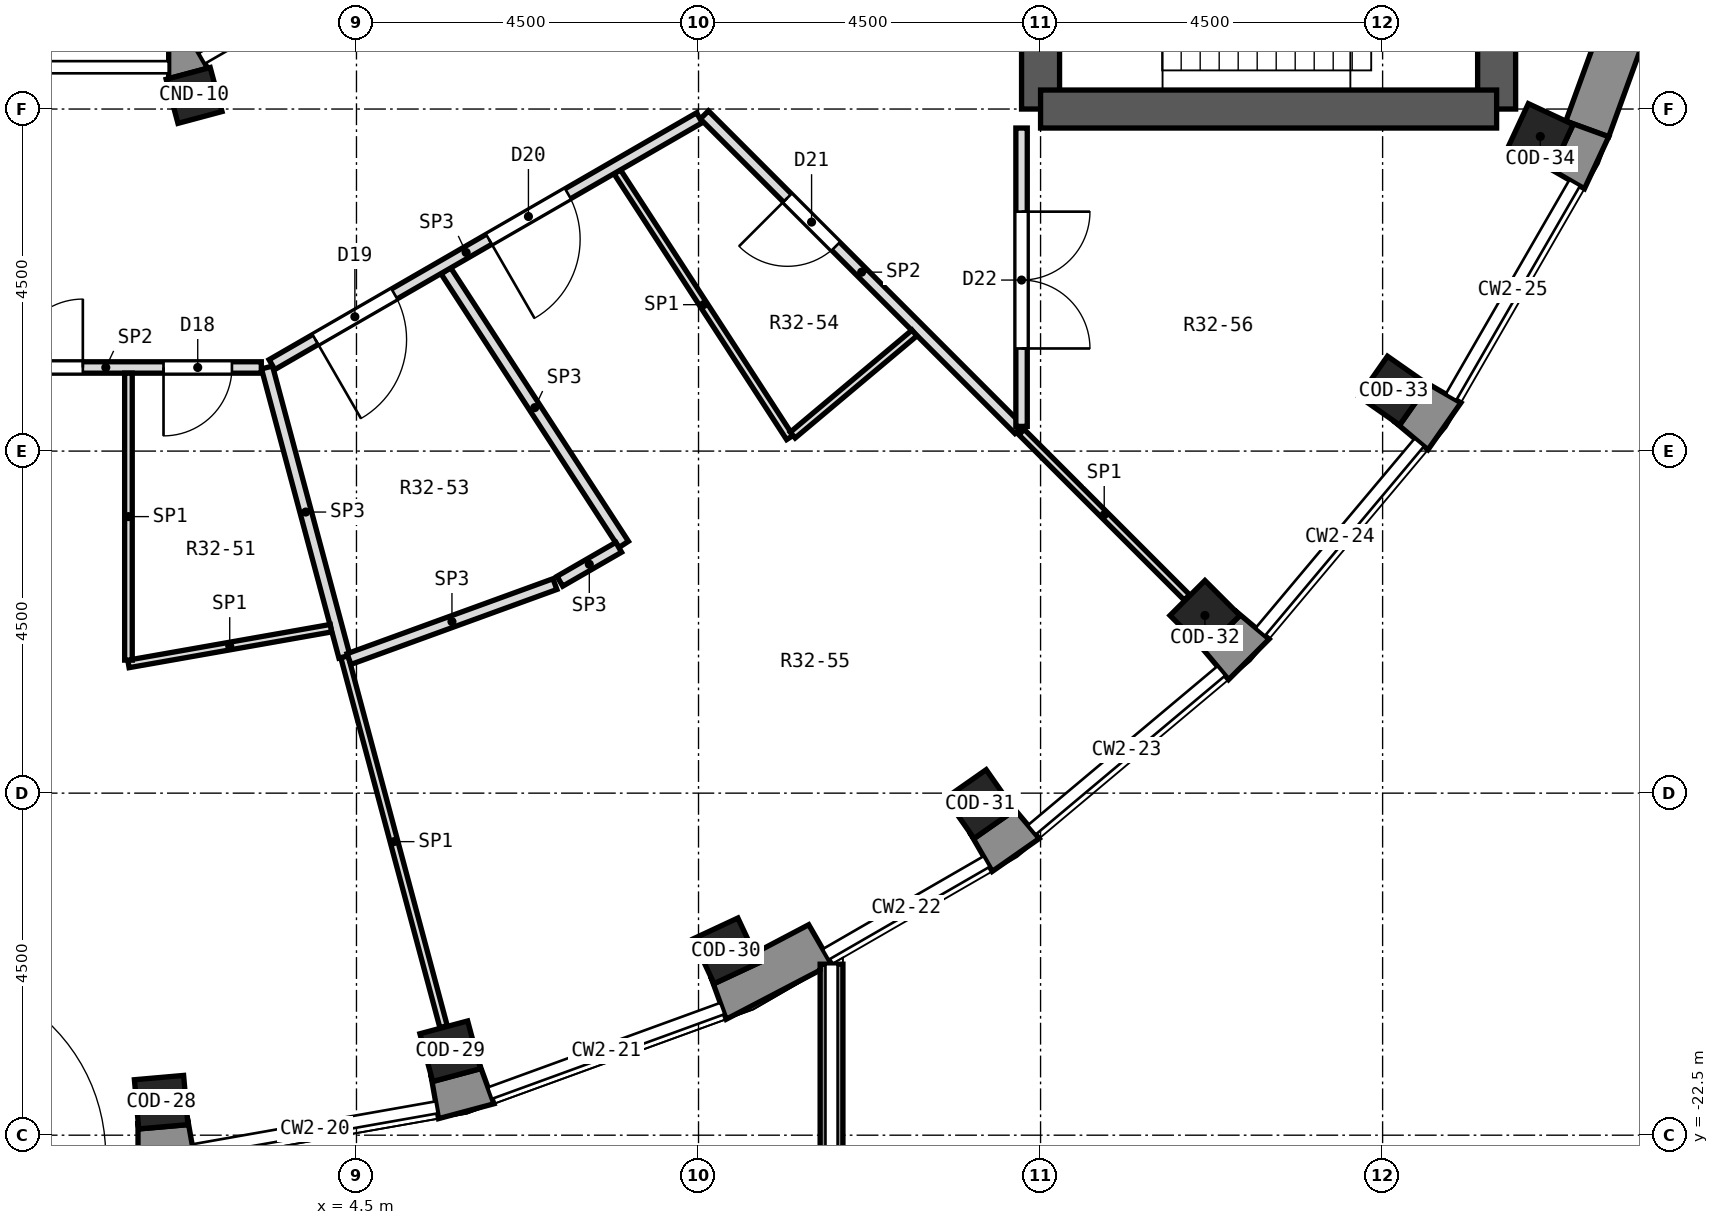
"""IFC4 building model, lengths in metres.
Left out: names, types, materials, properties, quantities, classifications, styles, units other than length and angle.
Written with IfcOpenShell. Run it as: python <this file> out.ifc"""

import sys

from ifc_helpers import new_model, si_unit, direction, frame, frame_2d, origin, origin_2d, place, context, subcontext, project, spatial, polyline, rectangle, outline, extrude, element, fill, save


model = new_model("IFC4")
c1 = context("Model", 3, precision=1e-05, world=origin(), true_north=direction((0.0, 1.0)))
c2 = subcontext(c1, "Body", "Model", "MODEL_VIEW")
j1 = project(units=[si_unit("LENGTHUNIT", "METRE"), si_unit("PLANEANGLEUNIT", "RADIAN")], contexts=[c1])
p1 = place(None, origin())
s1 = spatial("IfcSite", under=j1, at=p1, CompositionType="ELEMENT")
p2 = place(p1, origin())
s2 = spatial("IfcBuilding", under=s1, at=p2, CompositionType="ELEMENT")
p3 = place(p2, frame((0.0, 0.0, 224.7)))
s3 = spatial("IfcBuildingStorey", under=s2, at=p3, CompositionType="ELEMENT", Elevation=224.7)
p4 = place(p3, frame((10.75, -29.512, 0.0), z_axis=(0.0, 0.0, 1.0), x_axis=(0.0, 1.0, 0.0)))
e1 = element("IfcWall", 1, at=p4, inside=s3, PredefinedType="SOLIDWALL", context=c2, shape_type="SweptSolid", body=[
    extrude(rectangle(XDim=9.262, YDim=0.3, at=frame_2d((4.631, 0.0))), origin(), (0.0, 0.0, 1.0), 1.7),
])
for number, where, z_axis, x_axis in (
    (2, (1.93, -22.066, -1.15), (0.0, 0.0, 1.0), (0.087, -0.996, 0.0)),
    (3, (5.733, -21.395, -1.15), (0.0, 0.0, 1.0), (0.259, -0.966, 0.0)),
    (4, (9.361, -20.075, -1.15), (0.0, 0.0, 1.0), (0.423, -0.906, 0.0)),
):
    element("IfcColumn", number, at=place(p3, frame(where, z_axis=z_axis, x_axis=x_axis)), inside=s3, PredefinedType="COLUMN", context=c2, shape_type="SweptSolid", body=[
        extrude(rectangle(XDim=0.65, YDim=0.65, at=origin_2d()), origin(), (0.0, 0.0, 1.0), 6.15),
    ])
for number, where, z_axis, x_axis in (
    (5, (12.705, -18.144, -0.55), (0.0, 0.0, 1.0), (0.574, -0.819, 0.0)),
    (6, (15.662, -15.662, -0.55), (0.0, 0.0, 1.0), (0.707, -0.707, 0.0)),
    (7, (18.144, -12.705, -0.55), (0.0, 0.0, 1.0), (0.819, -0.574, 0.0)),
    (8, (20.075, -9.361, -0.55), (0.0, 0.0, 1.0), (0.906, -0.423, 0.0)),
):
    element("IfcColumn", number, at=place(p3, frame(where, z_axis=z_axis, x_axis=x_axis)), inside=s3, PredefinedType="COLUMN", context=c2, shape_type="SweptSolid", body=[
        extrude(rectangle(XDim=0.65, YDim=0.65, at=origin_2d()), origin(), (0.0, 0.0, 1.0), 5.55),
    ])
p5 = place(p3, frame((2.364, -8.821, 0.0), z_axis=(0.0, 0.0, 1.0), x_axis=(0.258819045103, -0.965925826289, 0.0)))
e9 = element("IfcColumn", 9, at=p5, inside=s3, PredefinedType="COLUMN", context=c2, shape_type="SweptSolid", body=[
    extrude(rectangle(XDim=0.6, YDim=0.6, at=origin_2d()), origin(), (0.0, 0.0, 1.0), 5.0),
])
p6 = place(p3, frame((13.5, -9.0, 0.0), z_axis=(0.0, 0.0, 1.0), x_axis=(0.0, 1.0, 0.0)))
e10 = element("IfcWall", 10, at=p6, inside=s3, PredefinedType="SHEAR", context=c2, shape_type="SweptSolid", body=[
    extrude(rectangle(XDim=18.0, YDim=0.5, at=frame_2d((9.0, 0.0))), origin(), (0.0, 0.0, 1.0), 5.0),
])
p7 = place(p6, frame((15.4, 0.0, 0.0)))
e11 = element("IfcOpeningElement", 11, at=p7, cuts=e10, PredefinedType="OPENING", context=c2, shape_type="SweptSolid", body=[
    extrude(rectangle(XDim=1.2, YDim=2.1, at=frame_2d((0.6, 1.05))), frame((0.0, 0.262, 0.0), z_axis=(0.0, -1.0, 0.0), x_axis=(1.0, 0.0, 0.0)), (0.0, 0.0, 1.0), 0.524),
])
p8 = place(p6, frame((1.4, 0.0, 0.0)))
e12 = element("IfcOpeningElement", 12, at=p8, cuts=e10, PredefinedType="OPENING", context=c2, shape_type="SweptSolid", body=[
    extrude(rectangle(XDim=1.2, YDim=2.1, at=frame_2d((0.6, 1.05))), frame((0.0, 0.262, 0.0), z_axis=(0.0, -1.0, 0.0), x_axis=(1.0, 0.0, 0.0)), (0.0, 0.0, 1.0), 0.524),
])
p9 = place(p6, frame((7.5, 0.0, 0.0)))
e13 = element("IfcOpeningElement", 13, at=p9, cuts=e10, PredefinedType="OPENING", context=c2, shape_type="SweptSolid", body=[
    extrude(rectangle(XDim=3.0, YDim=2.4, at=frame_2d((1.5, 1.2))), frame((0.0, 0.262, 0.0), z_axis=(0.0, -1.0, 0.0), x_axis=(1.0, 0.0, 0.0)), (0.0, 0.0, 1.0), 0.524),
])
p10 = place(p3, frame((19.5, -9.0, 0.0), z_axis=(0.0, 0.0, 1.0), x_axis=(0.0, 1.0, 0.0)))
e14 = element("IfcWall", 14, at=p10, inside=s3, PredefinedType="SHEAR", context=c2, shape_type="SweptSolid", body=[
    extrude(rectangle(XDim=18.0, YDim=0.5, at=frame_2d((9.0, 0.0))), origin(), (0.0, 0.0, 1.0), 5.0),
])
p11 = place(p10, frame((9.45, 0.0, 0.0)))
e15 = element("IfcOpeningElement", 15, at=p11, cuts=e14, PredefinedType="OPENING", context=c2, shape_type="SweptSolid", body=[
    extrude(rectangle(XDim=0.9, YDim=2.1, at=frame_2d((0.45, 1.05))), frame((0.0, 0.262, 0.0), z_axis=(0.0, -1.0, 0.0), x_axis=(1.0, 0.0, 0.0)), (0.0, 0.0, 1.0), 0.524),
])
p12 = place(p10, frame((7.65, 0.0, 0.0)))
e16 = element("IfcOpeningElement", 16, at=p12, cuts=e14, PredefinedType="OPENING", context=c2, shape_type="SweptSolid", body=[
    extrude(rectangle(XDim=0.9, YDim=2.1, at=frame_2d((0.45, 1.05))), frame((0.0, 0.262, 0.0), z_axis=(0.0, -1.0, 0.0), x_axis=(1.0, 0.0, 0.0)), (0.0, 0.0, 1.0), 0.524),
])
p13 = place(p3, frame((13.5, -9.0, 0.0), z_axis=(0.0, 0.0, 1.0), x_axis=(1.0, 0.0, 0.0)))
e17 = element("IfcWall", 17, at=p13, inside=s3, PredefinedType="SHEAR", context=c2, shape_type="SweptSolid", body=[
    extrude(rectangle(XDim=6.0, YDim=0.5, at=frame_2d((3.0, 0.0))), origin(), (0.0, 0.0, 1.0), 5.0),
])
p14 = place(p3, frame((20.693, -9.262, 0.0), z_axis=(0.0, 0.0, 1.0), x_axis=(0.342056509473, 0.939679383794, 0.0)))
e18 = element("IfcWall", 18, at=p14, inside=s3, PredefinedType="SOLIDWALL", context=c2, shape_type="SweptSolid", body=[
    extrude(rectangle(XDim=3.252, YDim=0.6, at=frame_2d((1.626, 0.0))), origin(), (0.0, 0.0, 1.0), 4.6),
])
p15 = place(p3, origin())
e19 = element("IfcWall", 19, at=p15, inside=s3, PredefinedType="SOLIDWALL", context=c2, shape_type="SweptSolid", body=[
    extrude(outline(polyline([(1.626, -22.913), (2.378, -22.847), (2.273, -22.256), (2.283, -22.361), (1.635, -22.418), (1.626, -22.312), (1.626, -22.913)])), origin(), (0.0, 0.0, 1.0), 4.6),
])
p16 = place(p3, origin())
e20 = element("IfcWall", 20, at=p16, inside=s3, PredefinedType="SOLIDWALL", context=c2, shape_type="SweptSolid", body=[
    extrude(outline(polyline([(6.309, -22.087), (6.104, -21.523), (6.131, -21.625), (5.503, -21.793), (5.476, -21.691), (5.58, -22.282), (6.309, -22.087)])), origin(), (0.0, 0.0, 1.0), 4.6),
])
p17 = place(p3, origin())
e21 = element("IfcWall", 21, at=p17, inside=s3, PredefinedType="SOLIDWALL", context=c2, shape_type="SweptSolid", body=[
    extrude(outline(polyline([(9.159, -20.411), (9.364, -20.975), (10.6, -20.329), (10.6, -20.25), (10.75, -20.25), (10.45, -19.731), (9.735, -20.107), (9.793, -20.232), (9.204, -20.507), (9.159, -20.411)])), origin(), (0.0, 0.0, 1.0), 4.6),
])
p18 = place(p3, origin())
e22 = element("IfcWall", 22, at=p18, inside=s3, PredefinedType="SOLIDWALL", context=c2, shape_type="SweptSolid", body=[
    extrude(outline(polyline([(12.864, -19.03), (13.482, -18.597), (13.097, -18.137), (13.157, -18.224), (12.625, -18.597), (12.564, -18.51), (12.864, -19.03)])), origin(), (0.0, 0.0, 1.0), 4.6),
])
p19 = place(p3, origin())
e23 = element("IfcWall", 23, at=p19, inside=s3, PredefinedType="SOLIDWALL", context=c2, shape_type="SweptSolid", body=[
    extrude(outline(polyline([(16.507, -15.973), (16.047, -15.588), (16.122, -15.662), (15.662, -16.122), (15.588, -16.047), (15.973, -16.507), (16.507, -15.973)])), origin(), (0.0, 0.0, 1.0), 4.6),
])
p20 = place(p3, origin())
e24 = element("IfcWall", 24, at=p20, inside=s3, PredefinedType="SOLIDWALL", context=c2, shape_type="SweptSolid", body=[
    extrude(outline(polyline([(19.03, -12.864), (18.51, -12.564), (18.597, -12.625), (18.224, -13.157), (18.137, -13.097), (18.597, -13.482), (19.03, -12.864)])), origin(), (0.0, 0.0, 1.0), 4.6),
])
p21 = place(p3, origin())
e25 = element("IfcWall", 25, at=p21, inside=s3, PredefinedType="SOLIDWALL", context=c2, shape_type="SweptSolid", body=[
    extrude(outline(polyline([(20.656, -10.048), (20.975, -9.364), (20.411, -9.159), (20.507, -9.204), (20.232, -9.793), (20.136, -9.748), (20.656, -10.048)])), origin(), (0.0, 0.0, 1.0), 4.6),
])
p22 = place(p3, origin())
e26 = element("IfcWall", 26, at=p22, inside=s3, PredefinedType="SOLIDWALL", context=c2, shape_type="SweptSolid", body=[
    extrude(outline(polyline([(2.542, -8.462), (2.242, -7.943), (2.029, -8.0), (2.029, -8.6), (2.542, -8.462)])), origin(), (0.0, 0.0, 1.0), 4.6),
])
p23 = place(p3, frame((4.342, -16.205, 0.0), z_axis=(0.0, 0.0, 1.0), x_axis=(0.258748195279, -0.965944807657, 0.0)))
e27 = element("IfcWall", 27, at=p23, inside=s3, PredefinedType="PARTITIONING", context=c2, shape_type="SweptSolid", body=[
    extrude(rectangle(XDim=5.039, YDim=0.1, at=frame_2d((2.519, 0.0))), origin(), (0.0, 0.0, 1.0), 4.6),
])
p24 = place(p3, frame((3.323, -12.4, 0.0), z_axis=(0.0, 0.0, 1.0), x_axis=(0.258646238559, -0.965972113096, 0.0)))
e28 = element("IfcWall", 28, at=p24, inside=s3, PredefinedType="PARTITIONING", context=c2, shape_type="SweptSolid", body=[
    extrude(rectangle(XDim=3.939, YDim=0.15, at=frame_2d((1.969, 0.0))), origin(), (0.0, 0.0, 1.0), 4.6),
])
p25 = place(p3, frame((5.676, -11.128, 0.0), z_axis=(0.0, 0.0, 1.0), x_axis=(0.544832434593, -0.838544941083, 0.0)))
e29 = element("IfcWall", 29, at=p25, inside=s3, PredefinedType="PARTITIONING", context=c2, shape_type="SweptSolid", body=[
    extrude(rectangle(XDim=4.293, YDim=0.15, at=frame_2d((2.146, 0.0))), origin(), (0.0, 0.0, 1.0), 4.6),
])
p26 = place(p3, frame((7.931, -9.826, 0.0), z_axis=(0.0, 0.0, 1.0), x_axis=(0.544576550515, -0.838711142545, 0.0)))
e30 = element("IfcWall", 30, at=p26, inside=s3, PredefinedType="PARTITIONING", context=c2, shape_type="SweptSolid", body=[
    extrude(rectangle(XDim=4.168, YDim=0.1, at=frame_2d((2.084, 0.0))), origin(), (0.0, 0.0, 1.0), 4.6),
])
p27 = place(p3, frame((13.25, -13.25, 0.0), z_axis=(0.0, 0.0, 1.0), x_axis=(0.707106781187, -0.707106781187, 0.0)))
e31 = element("IfcWall", 31, at=p27, inside=s3, PredefinedType="PARTITIONING", context=c2, shape_type="SweptSolid", body=[
    extrude(rectangle(XDim=3.077, YDim=0.1, at=frame_2d((1.538, 0.0))), origin(), (0.0, 0.0, 1.0), 4.6),
])
p28 = place(p3, frame((9.077, -9.077, 0.0), z_axis=(0.0, 0.0, 1.0), x_axis=(0.707106781187, -0.707106781187, 0.0)))
e32 = element("IfcWall", 32, at=p28, inside=s3, PredefinedType="PARTITIONING", context=c2, shape_type="SweptSolid", body=[
    extrude(rectangle(XDim=5.852, YDim=0.15, at=frame_2d((2.926, 0.0))), origin(), (0.0, 0.0, 1.0), 4.6),
])
p29 = place(p28, frame((1.545, 0.0, 0.0)))
e33 = element("IfcOpeningElement", 33, at=p29, cuts=e32, PredefinedType="OPENING", context=c2, shape_type="SweptSolid", body=[
    extrude(rectangle(XDim=0.9, YDim=2.1, at=frame_2d((0.45, 1.05))), frame((0.0, 0.087, 0.0), z_axis=(0.0, -1.0, 0.0), x_axis=(1.0, 0.0, 0.0)), (0.0, 0.0, 1.0), 0.174),
])
p30 = place(p3, frame((-3.248, -12.4, 0.0), z_axis=(0.0, 0.0, 1.0), x_axis=(1.0, 0.0, 0.0)))
e34 = element("IfcWall", 34, at=p30, inside=s3, PredefinedType="PARTITIONING", context=c2, shape_type="SweptSolid", body=[
    extrude(rectangle(XDim=6.496, YDim=0.15, at=frame_2d((3.248, 0.0))), origin(), (0.0, 0.0, 1.0), 4.6),
])
p31 = place(p30, frame((0.386, 0.0, 0.0)))
e35 = element("IfcOpeningElement", 35, at=p31, cuts=e34, PredefinedType="OPENING", context=c2, shape_type="SweptSolid", body=[
    extrude(rectangle(XDim=0.9, YDim=2.1, at=frame_2d((0.45, 1.05))), frame((0.0, 0.087, 0.0), z_axis=(0.0, -1.0, 0.0), x_axis=(1.0, 0.0, 0.0)), (0.0, 0.0, 1.0), 0.174),
])
p32 = place(p30, frame((2.348, 0.0, 0.0)))
e36 = element("IfcOpeningElement", 36, at=p32, cuts=e34, PredefinedType="OPENING", context=c2, shape_type="SweptSolid", body=[
    extrude(rectangle(XDim=1.8, YDim=2.1, at=frame_2d((0.9, 1.05))), frame((0.0, 0.087, 0.0), z_axis=(0.0, -1.0, 0.0), x_axis=(1.0, 0.0, 0.0)), (0.0, 0.0, 1.0), 0.174),
])
p33 = place(p30, frame((5.209, 0.0, 0.0)))
e37 = element("IfcOpeningElement", 37, at=p33, cuts=e34, PredefinedType="OPENING", context=c2, shape_type="SweptSolid", body=[
    extrude(rectangle(XDim=0.9, YDim=2.1, at=frame_2d((0.45, 1.05))), frame((0.0, 0.087, 0.0), z_axis=(0.0, -1.0, 0.0), x_axis=(1.0, 0.0, 0.0)), (0.0, 0.0, 1.0), 0.174),
])
p34 = place(p3, frame((1.5, -16.3, 0.0), z_axis=(0.0, 0.0, 1.0), x_axis=(0.98479355117, 0.173728701063, 0.0)))
e38 = element("IfcWall", 38, at=p34, inside=s3, PredefinedType="PARTITIONING", context=c2, shape_type="SweptSolid", body=[
    extrude(rectangle(XDim=2.705, YDim=0.1, at=frame_2d((1.353, 0.0))), origin(), (0.0, 0.0, 1.0), 4.6),
])
p35 = place(p3, frame((4.402, -16.236, 0.0), z_axis=(0.0, 0.0, 1.0), x_axis=(0.939709324203, 0.341974247578, 0.0)))
e39 = element("IfcWall", 39, at=p35, inside=s3, PredefinedType="PARTITIONING", context=c2, shape_type="SweptSolid", body=[
    extrude(rectangle(XDim=2.883, YDim=0.15, at=frame_2d((1.441, 0.0))), origin(), (0.0, 0.0, 1.0), 4.6),
])
p36 = place(p3, frame((7.176, -15.212, 0.0), z_axis=(0.0, 0.0, 1.0), x_axis=(0.866067377925, 0.499927291608, 0.0)))
e40 = element("IfcWall", 40, at=p36, inside=s3, PredefinedType="PARTITIONING", context=c2, shape_type="SweptSolid", body=[
    extrude(rectangle(XDim=0.894, YDim=0.15, at=frame_2d((0.447, 0.0))), origin(), (0.0, 0.0, 1.0), 4.6),
])
p37 = place(p3, frame((3.388, -12.363, 0.0), z_axis=(0.0, 0.0, 1.0), x_axis=(0.865967095912, 0.5001009786, 0.0)))
e41 = element("IfcWall", 41, at=p37, inside=s3, PredefinedType="PARTITIONING", context=c2, shape_type="SweptSolid", body=[
    extrude(rectangle(XDim=6.495, YDim=0.15, at=frame_2d((3.248, 0.0))), origin(), (0.0, 0.0, 1.0), 4.6),
])
p38 = place(p37, frame((0.66, 0.0, 0.0)))
e42 = element("IfcOpeningElement", 42, at=p38, cuts=e41, PredefinedType="OPENING", context=c2, shape_type="SweptSolid", body=[
    extrude(rectangle(XDim=1.2, YDim=2.1, at=frame_2d((0.6, 1.05))), frame((0.0, 0.087, 0.0), z_axis=(0.0, -1.0, 0.0), x_axis=(1.0, 0.0, 0.0)), (0.0, 0.0, 1.0), 0.174),
])
p39 = place(p37, frame((3.297, 0.0, 0.0)))
e43 = element("IfcOpeningElement", 43, at=p39, cuts=e41, PredefinedType="OPENING", context=c2, shape_type="SweptSolid", body=[
    extrude(rectangle(XDim=1.2, YDim=2.1, at=frame_2d((0.6, 1.05))), frame((0.0, 0.087, 0.0), z_axis=(0.0, -1.0, 0.0), x_axis=(1.0, 0.0, 0.0)), (0.0, 0.0, 1.0), 0.174),
])
p40 = place(p3, frame((10.239, -13.29, 0.0), z_axis=(0.0, 0.0, 1.0), x_axis=(0.766082082368, 0.642742750308, 0.0)))
e44 = element("IfcWall", 44, at=p40, inside=s3, PredefinedType="PARTITIONING", context=c2, shape_type="SweptSolid", body=[
    extrude(rectangle(XDim=2.09, YDim=0.1, at=frame_2d((1.045, 0.0))), origin(), (0.0, 0.0, 1.0), 4.6),
])
p41 = place(p3, frame((13.25, -13.175, 0.0), z_axis=(0.0, 0.0, 1.0), x_axis=(0.0, 1.0, 0.0)))
e45 = element("IfcWall", 45, at=p41, inside=s3, PredefinedType="PARTITIONING", context=c2, shape_type="SweptSolid", body=[
    extrude(rectangle(XDim=3.925, YDim=0.15, at=frame_2d((1.962, 0.0))), origin(), (0.0, 0.0, 1.0), 4.6),
])
p42 = place(p41, frame((1.025, 0.0, 0.0)))
e46 = element("IfcOpeningElement", 46, at=p42, cuts=e45, PredefinedType="OPENING", context=c2, shape_type="SweptSolid", body=[
    extrude(rectangle(XDim=1.8, YDim=2.1, at=frame_2d((0.9, 1.05))), frame((0.0, 0.087, 0.0), z_axis=(0.0, -1.0, 0.0), x_axis=(1.0, 0.0, 0.0)), (0.0, 0.0, 1.0), 0.174),
])
p43 = place(p3, frame((1.5, -16.25, 0.0), z_axis=(0.0, 0.0, 1.0), x_axis=(0.0, 1.0, 0.0)))
e47 = element("IfcWall", 47, at=p43, inside=s3, PredefinedType="PARTITIONING", context=c2, shape_type="SweptSolid", body=[
    extrude(rectangle(XDim=3.775, YDim=0.1, at=frame_2d((1.887, 0.0))), origin(), (0.0, 0.0, 1.0), 4.6),
])
p44 = place(p32, origin())
e48 = element("IfcDoor", 48, at=p44, inside=s3, OperationType="DOUBLE_DOOR_SINGLE_SWING", PredefinedType="DOOR", context=c2, shape_type="SweptSolid", body=[
    extrude(rectangle(XDim=1.8, YDim=2.1, at=frame_2d((0.9, 1.05))), frame((0.0, 0.025, 0.0), z_axis=(0.0, -1.0, 0.0), x_axis=(1.0, 0.0, 0.0)), (0.0, 0.0, 1.0), 0.05),
])
fill(e36, e48)
p45 = place(p33, frame((0.9, 0.0, 0.0), z_axis=(0.0, 0.0, 1.0), x_axis=(-1.0, 0.0, 0.0)))
e49 = element("IfcDoor", 49, at=p45, inside=s3, OperationType="SINGLE_SWING_RIGHT", PredefinedType="DOOR", context=c2, shape_type="SweptSolid", body=[
    extrude(rectangle(XDim=0.9, YDim=2.1, at=frame_2d((0.45, 1.05))), frame((0.0, 0.025, 0.0), z_axis=(0.0, -1.0, 0.0), x_axis=(1.0, 0.0, 0.0)), (0.0, 0.0, 1.0), 0.05),
])
fill(e37, e49)
p46 = place(p38, frame((1.2, 0.0, 0.0), z_axis=(0.0, 0.0, 1.0), x_axis=(-1.0, 0.0, 0.0)))
e50 = element("IfcDoor", 50, at=p46, inside=s3, OperationType="SINGLE_SWING_RIGHT", PredefinedType="DOOR", context=c2, shape_type="SweptSolid", body=[
    extrude(rectangle(XDim=1.2, YDim=2.1, at=frame_2d((0.6, 1.05))), frame((0.0, 0.025, 0.0), z_axis=(0.0, -1.0, 0.0), x_axis=(1.0, 0.0, 0.0)), (0.0, 0.0, 1.0), 0.05),
])
fill(e42, e50)
p47 = place(p39, frame((1.2, 0.0, 0.0), z_axis=(0.0, 0.0, 1.0), x_axis=(-1.0, 0.0, 0.0)))
e51 = element("IfcDoor", 51, at=p47, inside=s3, OperationType="SINGLE_SWING_RIGHT", PredefinedType="DOOR", context=c2, shape_type="SweptSolid", body=[
    extrude(rectangle(XDim=1.2, YDim=2.1, at=frame_2d((0.6, 1.05))), frame((0.0, 0.025, 0.0), z_axis=(0.0, -1.0, 0.0), x_axis=(1.0, 0.0, 0.0)), (0.0, 0.0, 1.0), 0.05),
])
fill(e43, e51)
p48 = place(p29, frame((0.9, 0.0, 0.0), z_axis=(0.0, 0.0, 1.0), x_axis=(-1.0, 0.0, 0.0)))
e52 = element("IfcDoor", 52, at=p48, inside=s3, OperationType="SINGLE_SWING_RIGHT", PredefinedType="DOOR", context=c2, shape_type="SweptSolid", body=[
    extrude(rectangle(XDim=0.9, YDim=2.1, at=frame_2d((0.45, 1.05))), frame((0.0, 0.025, 0.0), z_axis=(0.0, -1.0, 0.0), x_axis=(1.0, 0.0, 0.0)), (0.0, 0.0, 1.0), 0.05),
])
fill(e33, e52)
p49 = place(p42, frame((1.8, 0.0, 0.0), z_axis=(0.0, 0.0, 1.0), x_axis=(-1.0, 0.0, 0.0)))
e53 = element("IfcDoor", 53, at=p49, inside=s3, OperationType="DOUBLE_DOOR_SINGLE_SWING", PredefinedType="DOOR", context=c2, shape_type="SweptSolid", body=[
    extrude(rectangle(XDim=1.8, YDim=2.1, at=frame_2d((0.9, 1.05))), frame((0.0, 0.025, 0.0), z_axis=(0.0, -1.0, 0.0), x_axis=(1.0, 0.0, 0.0)), (0.0, 0.0, 1.0), 0.05),
])
fill(e46, e53)
save(model, sys.argv[1])
